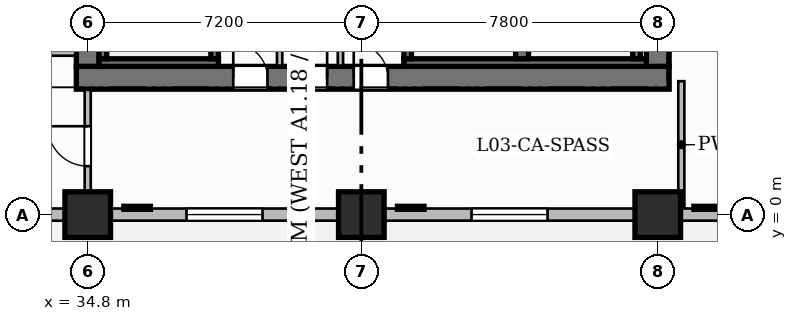
"""IFC4 building model, lengths in metres.
Left out: names, types, materials, properties, quantities, classifications, styles, units other than length and angle.
Written with IfcOpenShell. Run it as: python <this file> out.ifc"""

import sys

from ifc_helpers import new_model, si_unit, direction, frame, frame_2d, origin, origin_2d, place, context, subcontext, project, spatial, rectangle, extrude, source, transform, mapped, element, fill, save


model = new_model("IFC4")
c1 = context("Model", 3, precision=1e-05, world=origin(), true_north=direction((0.0, 1.0)))
c2 = subcontext(c1, "Body", "Model", "MODEL_VIEW")
j1 = project(units=[si_unit("LENGTHUNIT", "METRE"), si_unit("PLANEANGLEUNIT", "RADIAN")], contexts=[c1])
p1 = place(None, origin())
s1 = spatial("IfcSite", under=j1, at=p1, CompositionType="ELEMENT")
p2 = place(p1, origin())
s2 = spatial("IfcBuilding", under=s1, at=p2, CompositionType="ELEMENT")
p3 = place(p2, frame((0.0, 0.0, 16.2)))
s3 = spatial("IfcBuildingStorey", under=s2, at=p3, CompositionType="ELEMENT", Elevation=16.2)
p4 = place(p3, frame((34.5, 3.6, 0.0), z_axis=(0.0, 0.0, 1.0), x_axis=(1.0, 0.0, 0.0)))
e1 = element("IfcWall", 1, at=p4, inside=s3, PredefinedType="SHEAR", context=c2, shape_type="SweptSolid", body=[
    extrude(rectangle(XDim=15.6, YDim=0.6, at=frame_2d((7.8, 0.0))), origin(), (0.0, 0.0, 1.0), 5.4),
])
p5 = place(p4, frame((4.13, 0.0, 0.0)))
e2 = element("IfcOpeningElement", 2, at=p5, cuts=e1, PredefinedType="OPENING", context=c2, shape_type="SweptSolid", body=[
    extrude(rectangle(XDim=0.9, YDim=2.1, at=frame_2d((0.45, 1.05))), frame((0.0, 0.31, 0.0), z_axis=(0.0, -1.0, 0.0), x_axis=(1.0, 0.0, 0.0)), (0.0, 0.0, 1.0), 0.62),
])
p6 = place(p4, frame((5.7, 0.0, 0.0)))
e3 = element("IfcOpeningElement", 3, at=p6, cuts=e1, PredefinedType="OPENING", context=c2, shape_type="SweptSolid", body=[
    extrude(rectangle(XDim=0.9, YDim=2.1, at=frame_2d((0.45, 1.05))), frame((0.0, 0.31, 0.0), z_axis=(0.0, -1.0, 0.0), x_axis=(1.0, 0.0, 0.0)), (0.0, 0.0, 1.0), 0.62),
])
p7 = place(p4, frame((7.3, 0.0, 0.0)))
e4 = element("IfcOpeningElement", 4, at=p7, cuts=e1, PredefinedType="OPENING", context=c2, shape_type="SweptSolid", body=[
    extrude(rectangle(XDim=0.9, YDim=2.1, at=frame_2d((0.45, 1.05))), frame((0.0, 0.31, 0.0), z_axis=(0.0, -1.0, 0.0), x_axis=(1.0, 0.0, 0.0)), (0.0, 0.0, 1.0), 0.62),
])
for number, where, z_axis, x_axis in (
    (5, (34.8, 3.9, 0.0), (0.0, 0.0, 1.0), (0.0, 1.0, 0.0)),
    (6, (49.8, 3.9, 0.0), (0.0, 0.0, 1.0), (0.0, 1.0, 0.0)),
):
    element("IfcWall", number, at=place(p3, frame(where, z_axis=z_axis, x_axis=x_axis)), inside=s3, PredefinedType="SHEAR", context=c2, shape_type="SweptSolid", body=[
        extrude(rectangle(XDim=10.2, YDim=0.6, at=frame_2d((5.1, 0.0))), origin(), (0.0, 0.0, 1.0), 5.4),
    ])
m1 = source(origin(), c2, "Body", "SweptSolid", [
    extrude(rectangle(XDim=1.2, YDim=1.2, at=origin_2d()), origin(), (0.0, 0.0, 1.0), 5.4),
])
for number, where, z_axis, x_axis in (
    (7, (34.8, 0.0, 0.0), (0.0, 0.0, 1.0), (1.0, 0.0, 0.0)),
    (8, (42.0, 0.0, 0.0), (0.0, 0.0, 1.0), (1.0, 0.0, 0.0)),
    (9, (49.8, 0.0, 0.0), (0.0, 0.0, 1.0), (1.0, 0.0, 0.0)),
):
    element("IfcColumn", number, at=place(p3, frame(where, z_axis=z_axis, x_axis=x_axis)), inside=s3, PredefinedType="COLUMN", context=c2, shape_type="MappedRepresentation", body=[
        mapped(m1, transform((0.0, 0.0, 0.0), scale=1.0)),
    ])
p8 = place(p3, frame((35.1, 4.0, 0.0), z_axis=(0.0, 0.0, 1.0), x_axis=(1.0, 0.0, 0.0)))
e10 = element("IfcWall", 10, at=p8, inside=s3, PredefinedType="SHEAR", context=c2, shape_type="SweptSolid", body=[
    extrude(rectangle(XDim=3.14, YDim=0.2, at=frame_2d((1.57, 0.0))), origin(), (0.0, 0.0, 1.0), 5.4),
])
for number, where, z_axis, x_axis in (
    (11, (35.2, 4.1, 0.0), (0.0, 0.0, 1.0), (0.0, 1.0, 0.0)),
    (12, (38.14, 4.1, 0.0), (0.0, 0.0, 1.0), (0.0, 1.0, 0.0)),
):
    element("IfcWall", number, at=place(p3, frame(where, z_axis=z_axis, x_axis=x_axis)), inside=s3, PredefinedType="SHEAR", context=c2, shape_type="SweptSolid", body=[
        extrude(rectangle(XDim=6.95, YDim=0.2, at=frame_2d((3.475, 0.0))), origin(), (0.0, 0.0, 1.0), 5.4),
    ])
p9 = place(p3, frame((43.12, 4.0, 0.0), z_axis=(0.0, 0.0, 1.0), x_axis=(1.0, 0.0, 0.0)))
e13 = element("IfcWall", 13, at=p9, inside=s3, PredefinedType="SHEAR", context=c2, shape_type="SweptSolid", body=[
    extrude(rectangle(XDim=6.38, YDim=0.2, at=frame_2d((3.19, 0.0))), origin(), (0.0, 0.0, 1.0), 5.4),
])
p10 = place(p3, frame((43.22, 4.1, 0.0), z_axis=(0.0, 0.0, 1.0), x_axis=(0.0, 1.0, 0.0)))
e14 = element("IfcWall", 14, at=p10, inside=s3, PredefinedType="SHEAR", context=c2, shape_type="SweptSolid", body=[
    extrude(rectangle(XDim=6.95, YDim=0.2, at=frame_2d((3.475, 0.0))), origin(), (0.0, 0.0, 1.0), 5.4),
])
p11 = place(p3, frame((46.23, 4.1, 0.0), z_axis=(0.0, 0.0, 1.0), x_axis=(0.0, 1.0, 0.0)))
e15 = element("IfcWall", 15, at=p11, inside=s3, PredefinedType="SHEAR", context=c2, shape_type="SweptSolid", body=[
    extrude(rectangle(XDim=6.95, YDim=0.34, at=frame_2d((3.475, 0.0))), origin(), (0.0, 0.0, 1.0), 5.4),
])
p12 = place(p3, frame((49.24, 4.1, 0.0), z_axis=(0.0, 0.0, 1.0), x_axis=(0.0, 1.0, 0.0)))
e16 = element("IfcWall", 16, at=p12, inside=s3, PredefinedType="SHEAR", context=c2, shape_type="SweptSolid", body=[
    extrude(rectangle(XDim=6.95, YDim=0.2, at=frame_2d((3.475, 0.0))), origin(), (0.0, 0.0, 1.0), 5.4),
])
for number, where, z_axis, x_axis in (
    (17, (39.85, 3.92, 0.0), (0.0, 0.0, 1.0), (0.0, 1.0, 0.0)),
    (18, (41.45, 3.92, 0.0), (0.0, 0.0, 1.0), (0.0, 1.0, 0.0)),
):
    element("IfcWall", number, at=place(p3, frame(where, z_axis=z_axis, x_axis=x_axis)), inside=s3, PredefinedType="PARTITIONING", context=c2, shape_type="SweptSolid", body=[
        extrude(rectangle(XDim=2.16, YDim=0.14, at=frame_2d((1.08, 0.0))), origin(), (0.0, 0.0, 1.0), 5.1),
    ])
p13 = place(p3, frame((32.16, 4.28, 0.0), z_axis=(0.0, 0.0, 1.0), x_axis=(1.0, 0.0, 0.0)))
e19 = element("IfcWall", 19, at=p13, inside=s3, PredefinedType="PARTITIONING", context=c2, shape_type="SweptSolid", body=[
    extrude(rectangle(XDim=2.31, YDim=0.2, at=frame_2d((1.155, 0.0))), origin(), (0.0, 0.0, 1.0), 5.1),
])
p14 = place(p3, frame((34.8, 0.32, 0.0), z_axis=(0.0, 0.0, 1.0), x_axis=(0.0, 1.0, 0.0)))
e20 = element("IfcWall", 20, at=p14, inside=s3, PredefinedType="PARTITIONING", context=c2, shape_type="SweptSolid", body=[
    extrude(rectangle(XDim=2.96, YDim=0.16, at=frame_2d((1.48, 0.0))), origin(), (0.0, 0.0, 1.0), 5.1),
])
p15 = place(p14, frame((0.955, 0.0, 0.0)))
e21 = element("IfcOpeningElement", 21, at=p15, cuts=e20, PredefinedType="OPENING", context=c2, shape_type="SweptSolid", body=[
    extrude(rectangle(XDim=1.05, YDim=2.15, at=frame_2d((0.525, 1.075))), frame((0.0, 0.09, 0.0), z_axis=(0.0, -1.0, 0.0), x_axis=(1.0, 0.0, 0.0)), (0.0, 0.0, 1.0), 0.18),
])
p16 = place(p3, frame((50.42, 0.168, 0.0), z_axis=(0.0, 0.0, 1.0), x_axis=(0.0, 1.0, 0.0)))
e22 = element("IfcWall", 22, at=p16, inside=s3, PredefinedType="PARTITIONING", context=c2, shape_type="SweptSolid", body=[
    extrude(rectangle(XDim=3.342, YDim=0.16, at=frame_2d((1.671, 0.0))), origin(), (0.0, 0.0, 1.0), 5.1),
])
p17 = place(p3, frame((-4.8, 0.0, 0.0), z_axis=(0.0, 0.0, 1.0), x_axis=(1.0, 0.0, 0.0)))
e23 = element("IfcWall", 23, at=p17, inside=s3, PredefinedType="SOLIDWALL", context=c2, shape_type="SweptSolid", body=[
    extrude(rectangle(XDim=85.2, YDim=0.32, at=frame_2d((42.6, 0.0))), origin(), (0.0, 0.0, 1.0), 4.185),
])
p18 = place(p17, frame((1.4, 0.0, 0.75)))
e24 = element("IfcOpeningElement", 24, at=p18, cuts=e23, PredefinedType="OPENING", context=c2, shape_type="SweptSolid", body=[
    extrude(rectangle(XDim=2.0, YDim=2.6, at=frame_2d((1.0, 1.3))), frame((0.0, 0.17, 0.0), z_axis=(0.0, -1.0, 0.0), x_axis=(1.0, 0.0, 0.0)), (0.0, 0.0, 1.0), 0.34),
])
p19 = place(p17, frame((7.4, 0.0, 0.75)))
e25 = element("IfcOpeningElement", 25, at=p19, cuts=e23, PredefinedType="OPENING", context=c2, shape_type="SweptSolid", body=[
    extrude(rectangle(XDim=2.0, YDim=2.6, at=frame_2d((1.0, 1.3))), frame((0.0, 0.17, 0.0), z_axis=(0.0, -1.0, 0.0), x_axis=(1.0, 0.0, 0.0)), (0.0, 0.0, 1.0), 0.34),
])
p20 = place(p17, frame((14.6, 0.0, 0.75)))
e26 = element("IfcOpeningElement", 26, at=p20, cuts=e23, PredefinedType="OPENING", context=c2, shape_type="SweptSolid", body=[
    extrude(rectangle(XDim=2.0, YDim=2.6, at=frame_2d((1.0, 1.3))), frame((0.0, 0.17, 0.0), z_axis=(0.0, -1.0, 0.0), x_axis=(1.0, 0.0, 0.0)), (0.0, 0.0, 1.0), 0.34),
])
p21 = place(p17, frame((21.8, 0.0, 0.75)))
e27 = element("IfcOpeningElement", 27, at=p21, cuts=e23, PredefinedType="OPENING", context=c2, shape_type="SweptSolid", body=[
    extrude(rectangle(XDim=2.0, YDim=2.6, at=frame_2d((1.0, 1.3))), frame((0.0, 0.17, 0.0), z_axis=(0.0, -1.0, 0.0), x_axis=(1.0, 0.0, 0.0)), (0.0, 0.0, 1.0), 0.34),
])
p22 = place(p17, frame((29.0, 0.0, 0.75)))
e28 = element("IfcOpeningElement", 28, at=p22, cuts=e23, PredefinedType="OPENING", context=c2, shape_type="SweptSolid", body=[
    extrude(rectangle(XDim=2.0, YDim=2.6, at=frame_2d((1.0, 1.3))), frame((0.0, 0.17, 0.0), z_axis=(0.0, -1.0, 0.0), x_axis=(1.0, 0.0, 0.0)), (0.0, 0.0, 1.0), 0.34),
])
p23 = place(p17, frame((35.6, 0.0, 0.75)))
e29 = element("IfcOpeningElement", 29, at=p23, cuts=e23, PredefinedType="OPENING", context=c2, shape_type="SweptSolid", body=[
    extrude(rectangle(XDim=2.0, YDim=2.6, at=frame_2d((1.0, 1.3))), frame((0.0, 0.17, 0.0), z_axis=(0.0, -1.0, 0.0), x_axis=(1.0, 0.0, 0.0)), (0.0, 0.0, 1.0), 0.34),
])
p24 = place(p17, frame((42.2, 0.0, 0.75)))
e30 = element("IfcOpeningElement", 30, at=p24, cuts=e23, PredefinedType="OPENING", context=c2, shape_type="SweptSolid", body=[
    extrude(rectangle(XDim=2.0, YDim=2.6, at=frame_2d((1.0, 1.3))), frame((0.0, 0.17, 0.0), z_axis=(0.0, -1.0, 0.0), x_axis=(1.0, 0.0, 0.0)), (0.0, 0.0, 1.0), 0.34),
])
p25 = place(p17, frame((49.7, 0.0, 0.75)))
e31 = element("IfcOpeningElement", 31, at=p25, cuts=e23, PredefinedType="OPENING", context=c2, shape_type="SweptSolid", body=[
    extrude(rectangle(XDim=2.0, YDim=2.6, at=frame_2d((1.0, 1.3))), frame((0.0, 0.17, 0.0), z_axis=(0.0, -1.0, 0.0), x_axis=(1.0, 0.0, 0.0)), (0.0, 0.0, 1.0), 0.34),
])
p26 = place(p17, frame((57.5, 0.0, 0.75)))
e32 = element("IfcOpeningElement", 32, at=p26, cuts=e23, PredefinedType="OPENING", context=c2, shape_type="SweptSolid", body=[
    extrude(rectangle(XDim=2.0, YDim=2.6, at=frame_2d((1.0, 1.3))), frame((0.0, 0.17, 0.0), z_axis=(0.0, -1.0, 0.0), x_axis=(1.0, 0.0, 0.0)), (0.0, 0.0, 1.0), 0.34),
])
p27 = place(p17, frame((66.8, 0.0, 0.75)))
e33 = element("IfcOpeningElement", 33, at=p27, cuts=e23, PredefinedType="OPENING", context=c2, shape_type="SweptSolid", body=[
    extrude(rectangle(XDim=2.0, YDim=2.6, at=frame_2d((1.0, 1.3))), frame((0.0, 0.17, 0.0), z_axis=(0.0, -1.0, 0.0), x_axis=(1.0, 0.0, 0.0)), (0.0, 0.0, 1.0), 0.34),
])
p28 = place(p17, frame((77.6, 0.0, 0.75)))
e34 = element("IfcOpeningElement", 34, at=p28, cuts=e23, PredefinedType="OPENING", context=c2, shape_type="SweptSolid", body=[
    extrude(rectangle(XDim=2.0, YDim=2.6, at=frame_2d((1.0, 1.3))), frame((0.0, 0.17, 0.0), z_axis=(0.0, -1.0, 0.0), x_axis=(1.0, 0.0, 0.0)), (0.0, 0.0, 1.0), 0.34),
])
m2 = source(origin(), c2, "Body", "SweptSolid", [
    extrude(rectangle(XDim=0.9, YDim=2.1, at=frame_2d((0.45, 1.05))), frame((0.0, 0.025, 0.0), z_axis=(0.0, -1.0, 0.0), x_axis=(1.0, 0.0, 0.0)), (0.0, 0.0, 1.0), 0.05),
])
p29 = place(p5, origin())
e35 = element("IfcDoor", 35, at=p29, inside=s3, OperationType="SINGLE_SWING_LEFT", PredefinedType="DOOR", context=c2, shape_type="MappedRepresentation", body=[
    mapped(m2, transform((0.0, 0.0, 0.0), scale=1.0)),
])
fill(e2, e35)
p30 = place(p6, origin())
e36 = element("IfcDoor", 36, at=p30, inside=s3, OperationType="SINGLE_SWING_RIGHT", PredefinedType="DOOR", context=c2, shape_type="MappedRepresentation", body=[
    mapped(m2, transform((0.0, 0.0, 0.0), scale=1.0)),
])
fill(e3, e36)
p31 = place(p7, origin())
e37 = element("IfcDoor", 37, at=p31, inside=s3, OperationType="SINGLE_SWING_LEFT", PredefinedType="DOOR", context=c2, shape_type="MappedRepresentation", body=[
    mapped(m2, transform((0.0, 0.0, 0.0), scale=1.0)),
])
fill(e4, e37)
m3 = source(origin(), c2, "Body", "SweptSolid", [
    extrude(rectangle(XDim=1.05, YDim=2.15, at=frame_2d((0.525, 1.075))), frame((0.0, 0.025, 0.0), z_axis=(0.0, -1.0, 0.0), x_axis=(1.0, 0.0, 0.0)), (0.0, 0.0, 1.0), 0.05),
])
p32 = place(p15, origin())
e38 = element("IfcDoor", 38, at=p32, inside=s3, OperationType="SINGLE_SWING_RIGHT", PredefinedType="DOOR", context=c2, shape_type="MappedRepresentation", body=[
    mapped(m3, transform((0.0, 0.0, 0.0), scale=1.0)),
])
fill(e21, e38)
m4 = source(origin(), c2, "Body", "SweptSolid", [
    extrude(rectangle(XDim=2.0, YDim=2.6, at=frame_2d((1.0, 1.3))), frame((0.0, 0.03, 0.0), z_axis=(0.0, -1.0, 0.0), x_axis=(1.0, 0.0, 0.0)), (0.0, 0.0, 1.0), 0.06),
])
p33 = place(p24, origin())
e39 = element("IfcWindow", 39, at=p33, inside=s3, PartitioningType="DOUBLE_PANEL_VERTICAL", PredefinedType="WINDOW", context=c2, shape_type="MappedRepresentation", body=[
    mapped(m4, transform((0.0, 0.0, 0.0), scale=1.0)),
])
fill(e30, e39)
p34 = place(p25, origin())
e40 = element("IfcWindow", 40, at=p34, inside=s3, PartitioningType="DOUBLE_PANEL_VERTICAL", PredefinedType="WINDOW", context=c2, shape_type="MappedRepresentation", body=[
    mapped(m4, transform((0.0, 0.0, 0.0), scale=1.0)),
])
fill(e31, e40)
save(model, sys.argv[1])
